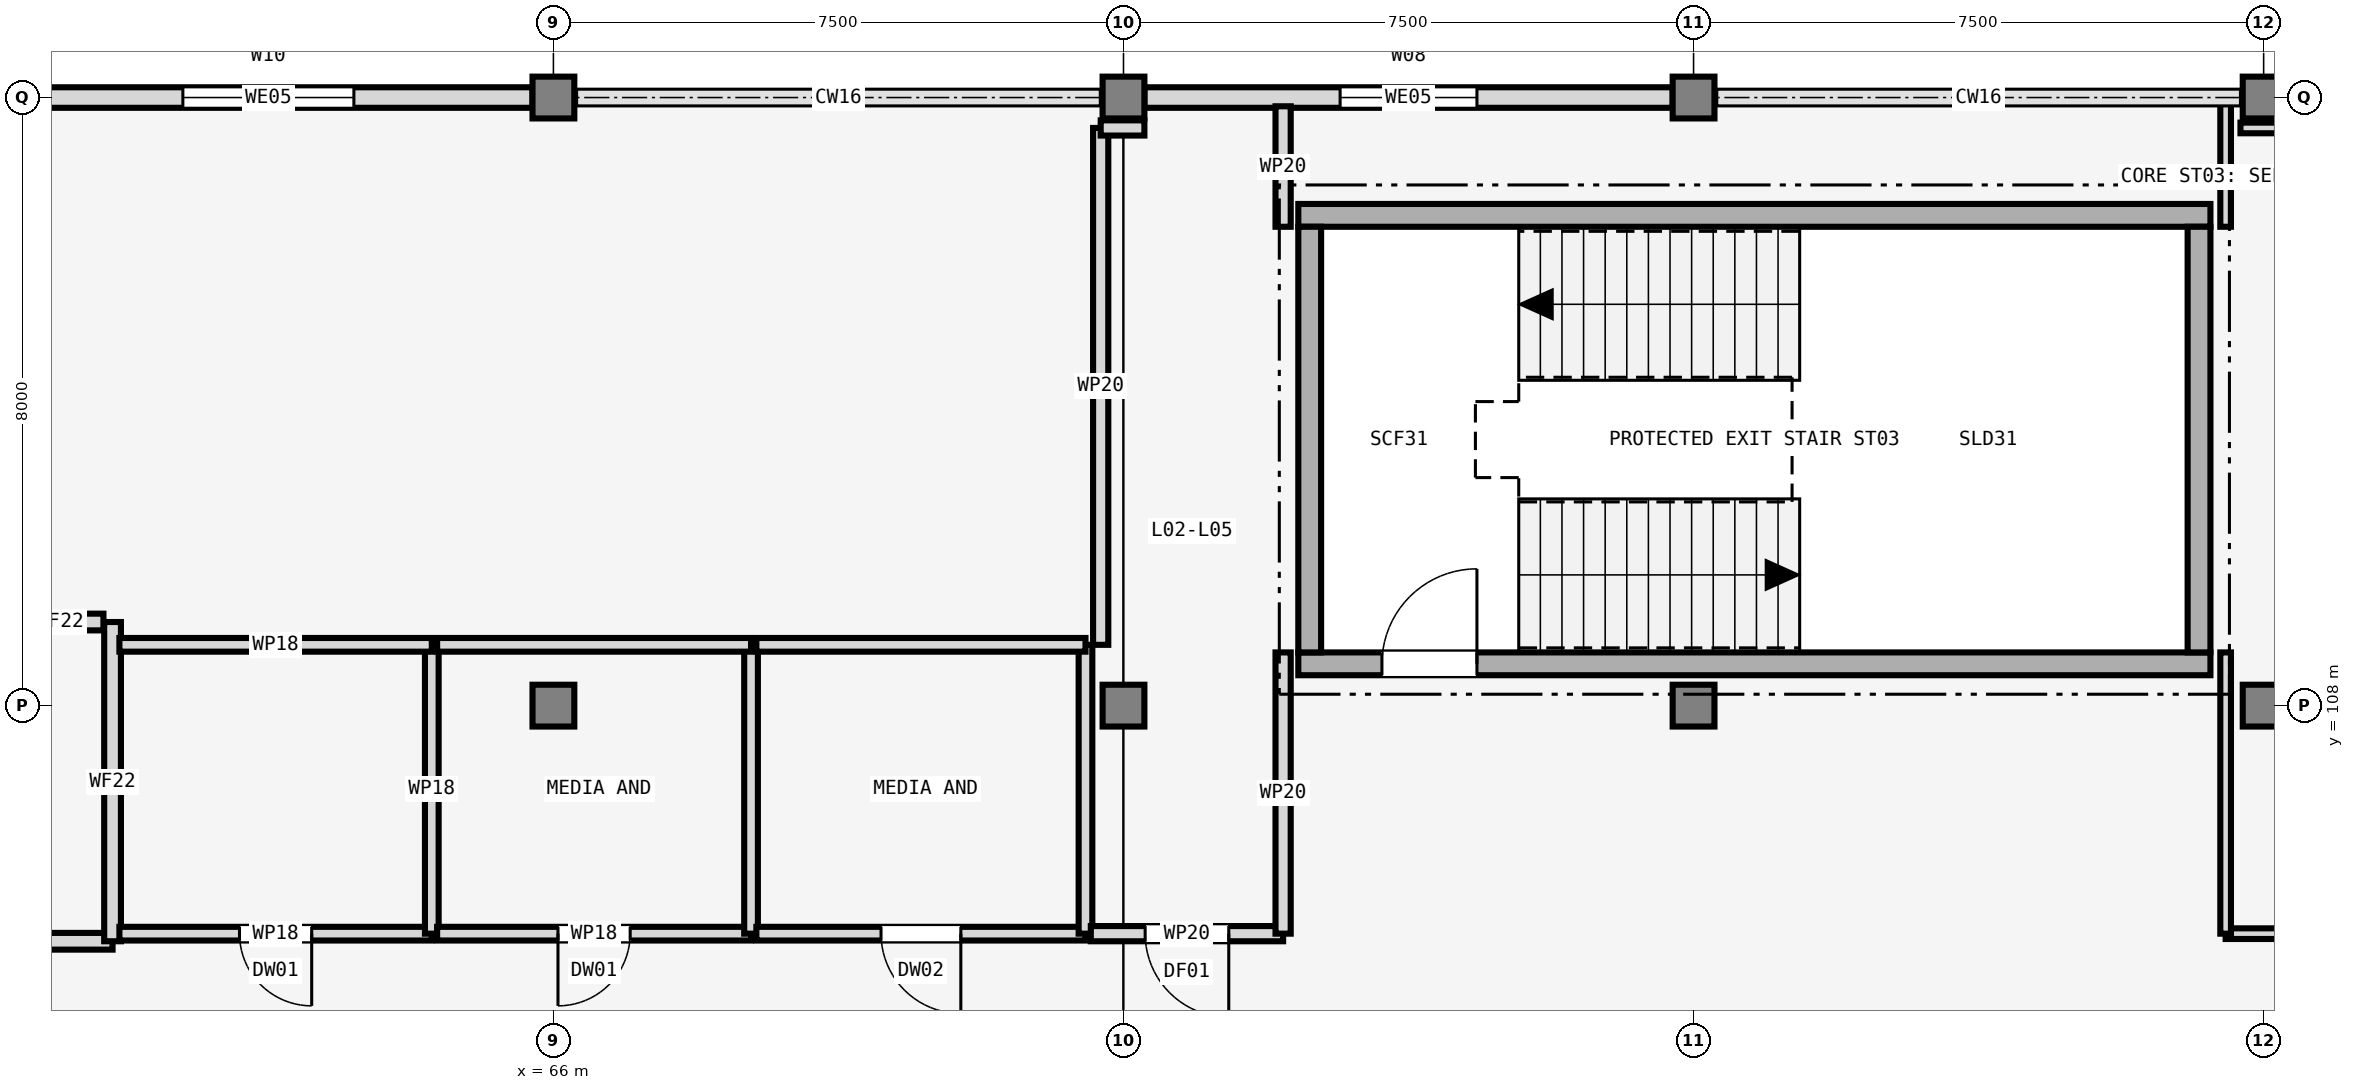
"""IFC4 building model, lengths in metres.
Left out: names, types, materials, properties, quantities, classifications, styles, units other than length and angle.
Written with IfcOpenShell. Run it as: python <this file> out.ifc"""

import sys

from ifc_helpers import new_model, si_unit, direction, frame, frame_2d, origin, origin_2d, place, context, subcontext, project, spatial, rectangle, extrude, element, fill, save


model = new_model("IFC4")
c1 = context("Model", 3, precision=1e-05, world=origin(), true_north=direction((0.0, 1.0)))
c2 = subcontext(c1, "Body", "Model", "MODEL_VIEW")
j1 = project(units=[si_unit("LENGTHUNIT", "METRE"), si_unit("PLANEANGLEUNIT", "RADIAN")], contexts=[c1])
p1 = place(None, origin())
s1 = spatial("IfcSite", under=j1, at=p1, CompositionType="ELEMENT")
p2 = place(p1, origin())
s2 = spatial("IfcBuilding", under=s1, at=p2, CompositionType="ELEMENT")
p3 = place(p2, frame((0.0, 0.0, 9.3)))
s3 = spatial("IfcBuildingStorey", under=s2, at=p3, CompositionType="ELEMENT", Elevation=9.3)
for number, where, z_axis, x_axis in (
    (1, (66.0, 108.0, 0.0), (0.0, 0.0, 1.0), (1.0, 0.0, 0.0)),
    (2, (66.0, 116.0, 0.0), (0.0, 0.0, 1.0), (1.0, 0.0, 0.0)),
    (3, (73.5, 108.0, 0.0), (0.0, 0.0, 1.0), (1.0, 0.0, 0.0)),
    (4, (73.5, 116.0, 0.0), (0.0, 0.0, 1.0), (1.0, 0.0, 0.0)),
    (5, (81.0, 108.0, 0.0), (0.0, 0.0, 1.0), (1.0, 0.0, 0.0)),
    (6, (81.0, 116.0, 0.0), (0.0, 0.0, 1.0), (1.0, 0.0, 0.0)),
    (7, (88.5, 108.0, 0.0), (0.0, 0.0, 1.0), (1.0, 0.0, 0.0)),
    (8, (88.5, 116.0, 0.0), (0.0, 0.0, 1.0), (1.0, 0.0, 0.0)),
):
    element("IfcColumn", number, at=place(p3, frame(where, z_axis=z_axis, x_axis=x_axis)), inside=s3, PredefinedType="COLUMN", context=c2, shape_type="SweptSolid", body=[
        extrude(rectangle(XDim=0.55, YDim=0.55, at=origin_2d()), origin(), (0.0, 0.0, 1.0), 4.2),
    ])
p4 = place(p3, frame((65.725, 116.0, 0.0), z_axis=(0.0, 0.0, 1.0), x_axis=(-1.0, 0.0, 0.0)))
e9 = element("IfcWall", 9, at=p4, inside=s3, PredefinedType="SOLIDWALL", context=c2, shape_type="SweptSolid", body=[
    extrude(rectangle(XDim=6.95, YDim=0.27, at=frame_2d((3.475, 0.0))), origin(), (0.0, 0.0, 1.0), 3.42),
])
p5 = place(p4, frame((2.35, 0.0, 0.95)))
e10 = element("IfcOpeningElement", 10, at=p5, cuts=e9, PredefinedType="OPENING", context=c2, shape_type="SweptSolid", body=[
    extrude(rectangle(XDim=2.25, YDim=1.65, at=frame_2d((1.125, 0.825))), frame((0.0, 0.145, 0.0), z_axis=(0.0, -1.0, 0.0), x_axis=(1.0, 0.0, 0.0)), (0.0, 0.0, 1.0), 0.29),
])
p6 = place(p3, frame((80.725, 116.0, 0.0), z_axis=(0.0, 0.0, 1.0), x_axis=(-1.0, 0.0, 0.0)))
e11 = element("IfcWall", 11, at=p6, inside=s3, PredefinedType="SOLIDWALL", context=c2, shape_type="SweptSolid", body=[
    extrude(rectangle(XDim=6.95, YDim=0.27, at=frame_2d((3.475, 0.0))), origin(), (0.0, 0.0, 1.0), 3.42),
])
p7 = place(p6, frame((2.575, 0.0, 0.95)))
e12 = element("IfcOpeningElement", 12, at=p7, cuts=e11, PredefinedType="OPENING", context=c2, shape_type="SweptSolid", body=[
    extrude(rectangle(XDim=1.8, YDim=1.5, at=frame_2d((0.9, 0.75))), frame((0.0, 0.145, 0.0), z_axis=(0.0, -1.0, 0.0), x_axis=(1.0, 0.0, 0.0)), (0.0, 0.0, 1.0), 0.29),
])
p8 = place(p3, frame((75.8, 108.55, 0.0), z_axis=(0.0, 0.0, 1.0), x_axis=(1.0, 0.0, 0.0)))
e13 = element("IfcWall", 13, at=p8, inside=s3, PredefinedType="SHEAR", context=c2, shape_type="SweptSolid", body=[
    extrude(rectangle(XDim=12.0, YDim=0.3, at=frame_2d((6.0, 0.0))), origin(), (0.0, 0.0, 1.0), 4.2),
])
p9 = place(p8, frame((1.1, 0.0, 0.0)))
e14 = element("IfcOpeningElement", 14, at=p9, cuts=e13, PredefinedType="OPENING", context=c2, shape_type="SweptSolid", body=[
    extrude(rectangle(XDim=1.25, YDim=2.15, at=frame_2d((0.625, 1.075))), frame((0.0, 0.16, 0.0), z_axis=(0.0, -1.0, 0.0), x_axis=(1.0, 0.0, 0.0)), (0.0, 0.0, 1.0), 0.32),
])
p10 = place(p3, frame((87.8, 114.45, 0.0), z_axis=(0.0, 0.0, 1.0), x_axis=(-1.0, 0.0, 0.0)))
e15 = element("IfcWall", 15, at=p10, inside=s3, PredefinedType="SHEAR", context=c2, shape_type="SweptSolid", body=[
    extrude(rectangle(XDim=12.0, YDim=0.3, at=frame_2d((6.0, 0.0))), origin(), (0.0, 0.0, 1.0), 4.2),
])
for number, where, z_axis, x_axis in (
    (16, (75.95, 114.3, 0.0), (0.0, 0.0, 1.0), (0.0, -1.0, 0.0)),
    (17, (87.65, 108.7, 0.0), (0.0, 0.0, 1.0), (0.0, 1.0, 0.0)),
):
    element("IfcWall", number, at=place(p3, frame(where, z_axis=z_axis, x_axis=x_axis)), inside=s3, PredefinedType="SHEAR", context=c2, shape_type="SweptSolid", body=[
        extrude(rectangle(XDim=5.6, YDim=0.3, at=frame_2d((2.8, 0.0))), origin(), (0.0, 0.0, 1.0), 4.2),
    ])
p11 = place(p3, frame((55.92, 104.9, 0.0), z_axis=(0.0, 0.0, 1.0), x_axis=(1.0, 0.0, 0.0)))
e18 = element("IfcWall", 18, at=p11, inside=s3, PredefinedType="SOLIDWALL", context=c2, shape_type="SweptSolid", body=[
    extrude(rectangle(XDim=4.28, YDim=0.22, at=frame_2d((2.14, 0.0))), origin(), (0.0, 0.0, 1.0), 3.12),
])
p12 = place(p11, frame((1.24, 0.0, 0.0)))
e19 = element("IfcOpeningElement", 19, at=p12, cuts=e18, PredefinedType="OPENING", context=c2, shape_type="SweptSolid", body=[
    extrude(rectangle(XDim=1.8, YDim=2.2, at=frame_2d((0.9, 1.1))), frame((0.0, 0.12, 0.0), z_axis=(0.0, -1.0, 0.0), x_axis=(1.0, 0.0, 0.0)), (0.0, 0.0, 1.0), 0.24),
])
p13 = place(p3, frame((60.2, 104.9, 0.0), z_axis=(0.0, 0.0, 1.0), x_axis=(0.0, 1.0, 0.0)))
e20 = element("IfcWall", 20, at=p13, inside=s3, PredefinedType="SOLIDWALL", context=c2, shape_type="SweptSolid", body=[
    extrude(rectangle(XDim=4.2, YDim=0.22, at=frame_2d((2.1, 0.0))), origin(), (0.0, 0.0, 1.0), 3.12),
])
p14 = place(p3, frame((58.95, 109.1, 0.0), z_axis=(0.0, 0.0, 1.0), x_axis=(1.0, 0.0, 0.0)))
e21 = element("IfcWall", 21, at=p14, inside=s3, PredefinedType="SOLIDWALL", context=c2, shape_type="SweptSolid", body=[
    extrude(rectangle(XDim=1.13, YDim=0.22, at=frame_2d((0.565, 0.0))), origin(), (0.0, 0.0, 1.0), 3.12),
])
p15 = place(p3, frame((64.4, 105.0, 0.0), z_axis=(0.0, 0.0, 1.0), x_axis=(-1.0, 0.0, 0.0)))
e22 = element("IfcWall", 22, at=p15, inside=s3, PredefinedType="PARTITIONING", context=c2, shape_type="SweptSolid", body=[
    extrude(rectangle(XDim=4.11, YDim=0.18, at=frame_2d((2.055, 0.0))), origin(), (0.0, 0.0, 1.0), 3.12),
])
p16 = place(p15, frame((1.58, 0.0, 0.0)))
e23 = element("IfcOpeningElement", 23, at=p16, cuts=e22, PredefinedType="OPENING", context=c2, shape_type="SweptSolid", body=[
    extrude(rectangle(XDim=0.95, YDim=2.1, at=frame_2d((0.475, 1.05))), frame((0.0, 0.1, 0.0), z_axis=(0.0, -1.0, 0.0), x_axis=(1.0, 0.0, 0.0)), (0.0, 0.0, 1.0), 0.2),
])
p17 = place(p3, frame((64.4, 108.8, 0.0), z_axis=(0.0, 0.0, 1.0), x_axis=(0.0, -1.0, 0.0)))
e24 = element("IfcWall", 24, at=p17, inside=s3, PredefinedType="PARTITIONING", context=c2, shape_type="SweptSolid", body=[
    extrude(rectangle(XDim=3.8, YDim=0.18, at=frame_2d((1.9, 0.0))), origin(), (0.0, 0.0, 1.0), 3.12),
])
p18 = place(p3, frame((60.29, 108.8, 0.0), z_axis=(0.0, 0.0, 1.0), x_axis=(1.0, 0.0, 0.0)))
e25 = element("IfcWall", 25, at=p18, inside=s3, PredefinedType="PARTITIONING", context=c2, shape_type="SweptSolid", body=[
    extrude(rectangle(XDim=4.11, YDim=0.18, at=frame_2d((2.055, 0.0))), origin(), (0.0, 0.0, 1.0), 3.12),
])
p19 = place(p3, frame((68.6, 105.0, 0.0), z_axis=(0.0, 0.0, 1.0), x_axis=(-1.0, 0.0, 0.0)))
e26 = element("IfcWall", 26, at=p19, inside=s3, PredefinedType="PARTITIONING", context=c2, shape_type="SweptSolid", body=[
    extrude(rectangle(XDim=4.13, YDim=0.18, at=frame_2d((2.065, 0.0))), origin(), (0.0, 0.0, 1.0), 3.12),
])
p20 = place(p19, frame((1.59, 0.0, 0.0)))
e27 = element("IfcOpeningElement", 27, at=p20, cuts=e26, PredefinedType="OPENING", context=c2, shape_type="SweptSolid", body=[
    extrude(rectangle(XDim=0.95, YDim=2.1, at=frame_2d((0.475, 1.05))), frame((0.0, 0.1, 0.0), z_axis=(0.0, -1.0, 0.0), x_axis=(1.0, 0.0, 0.0)), (0.0, 0.0, 1.0), 0.2),
])
p21 = place(p3, frame((68.6, 108.8, 0.0), z_axis=(0.0, 0.0, 1.0), x_axis=(0.0, -1.0, 0.0)))
e28 = element("IfcWall", 28, at=p21, inside=s3, PredefinedType="PARTITIONING", context=c2, shape_type="SweptSolid", body=[
    extrude(rectangle(XDim=3.8, YDim=0.18, at=frame_2d((1.9, 0.0))), origin(), (0.0, 0.0, 1.0), 3.12),
])
p22 = place(p3, frame((64.47, 108.8, 0.0), z_axis=(0.0, 0.0, 1.0), x_axis=(1.0, 0.0, 0.0)))
e29 = element("IfcWall", 29, at=p22, inside=s3, PredefinedType="PARTITIONING", context=c2, shape_type="SweptSolid", body=[
    extrude(rectangle(XDim=4.13, YDim=0.18, at=frame_2d((2.065, 0.0))), origin(), (0.0, 0.0, 1.0), 3.12),
])
p23 = place(p3, frame((73.0, 105.0, 0.0), z_axis=(0.0, 0.0, 1.0), x_axis=(-1.0, 0.0, 0.0)))
e30 = element("IfcWall", 30, at=p23, inside=s3, PredefinedType="PARTITIONING", context=c2, shape_type="SweptSolid", body=[
    extrude(rectangle(XDim=4.33, YDim=0.18, at=frame_2d((2.165, 0.0))), origin(), (0.0, 0.0, 1.0), 3.12),
])
p24 = place(p23, frame((1.64, 0.0, 0.0)))
e31 = element("IfcOpeningElement", 31, at=p24, cuts=e30, PredefinedType="OPENING", context=c2, shape_type="SweptSolid", body=[
    extrude(rectangle(XDim=1.05, YDim=2.1, at=frame_2d((0.525, 1.05))), frame((0.0, 0.1, 0.0), z_axis=(0.0, -1.0, 0.0), x_axis=(1.0, 0.0, 0.0)), (0.0, 0.0, 1.0), 0.2),
])
p25 = place(p3, frame((73.0, 108.8, 0.0), z_axis=(0.0, 0.0, 1.0), x_axis=(0.0, -1.0, 0.0)))
e32 = element("IfcWall", 32, at=p25, inside=s3, PredefinedType="PARTITIONING", context=c2, shape_type="SweptSolid", body=[
    extrude(rectangle(XDim=3.8, YDim=0.18, at=frame_2d((1.9, 0.0))), origin(), (0.0, 0.0, 1.0), 3.12),
])
p26 = place(p3, frame((68.67, 108.8, 0.0), z_axis=(0.0, 0.0, 1.0), x_axis=(1.0, 0.0, 0.0)))
e33 = element("IfcWall", 33, at=p26, inside=s3, PredefinedType="PARTITIONING", context=c2, shape_type="SweptSolid", body=[
    extrude(rectangle(XDim=4.33, YDim=0.18, at=frame_2d((2.165, 0.0))), origin(), (0.0, 0.0, 1.0), 3.12),
])
p27 = place(p3, frame((133.385, 105.0, 0.0), z_axis=(0.0, 0.0, 1.0), x_axis=(-1.0, 0.0, 0.0)))
e34 = element("IfcWall", 34, at=p27, inside=s3, PredefinedType="PARTITIONING", context=c2, shape_type="SweptSolid", body=[
    extrude(rectangle(XDim=45.385, YDim=0.14, at=frame_2d((22.692, 0.0))), origin(), (0.0, 0.0, 1.0), 3.12),
])
p28 = place(p27, frame((22.093, 0.0, 0.0)))
e35 = element("IfcOpeningElement", 35, at=p28, cuts=e34, PredefinedType="OPENING", context=c2, shape_type="SweptSolid", body=[
    extrude(rectangle(XDim=1.2, YDim=2.15, at=frame_2d((0.6, 1.075))), frame((0.0, 0.08, 0.0), z_axis=(0.0, -1.0, 0.0), x_axis=(1.0, 0.0, 0.0)), (0.0, 0.0, 1.0), 0.16),
])
p29 = place(p3, frame((88.0, 105.0, 0.0), z_axis=(0.0, 0.0, 1.0), x_axis=(0.0, 1.0, 0.0)))
e36 = element("IfcWall", 36, at=p29, inside=s3, PredefinedType="PARTITIONING", context=c2, shape_type="SweptSolid", body=[
    extrude(rectangle(XDim=3.7, YDim=0.14, at=frame_2d((1.85, 0.0))), origin(), (0.0, 0.0, 1.0), 3.12),
])
p30 = place(p3, frame((88.0, 114.3, 0.0), z_axis=(0.0, 0.0, 1.0), x_axis=(0.0, 1.0, 0.0)))
e37 = element("IfcWall", 37, at=p30, inside=s3, PredefinedType="PARTITIONING", context=c2, shape_type="SweptSolid", body=[
    extrude(rectangle(XDim=1.645, YDim=0.14, at=frame_2d((0.823, 0.0))), origin(), (0.0, 0.0, 1.0), 3.12),
])
p31 = place(p3, frame((88.195, 115.6, 0.0), z_axis=(0.0, 0.0, 1.0), x_axis=(1.0, 0.0, 0.0)))
e38 = element("IfcWall", 38, at=p31, inside=s3, PredefinedType="PARTITIONING", context=c2, shape_type="SweptSolid", body=[
    extrude(rectangle(XDim=0.58, YDim=0.14, at=frame_2d((0.29, 0.0))), origin(), (0.0, 0.0, 1.0), 3.12),
])
p32 = place(p3, frame((75.6, 105.0, 0.0), z_axis=(0.0, 0.0, 1.0), x_axis=(-1.0, 0.0, 0.0)))
e39 = element("IfcWall", 39, at=p32, inside=s3, PredefinedType="PARTITIONING", context=c2, shape_type="SweptSolid", body=[
    extrude(rectangle(XDim=2.53, YDim=0.2, at=frame_2d((1.265, 0.0))), origin(), (0.0, 0.0, 1.0), 3.12),
])
p33 = place(p32, frame((0.715, 0.0, 0.0)))
e40 = element("IfcOpeningElement", 40, at=p33, cuts=e39, PredefinedType="OPENING", context=c2, shape_type="SweptSolid", body=[
    extrude(rectangle(XDim=1.1, YDim=2.15, at=frame_2d((0.55, 1.075))), frame((0.0, 0.11, 0.0), z_axis=(0.0, -1.0, 0.0), x_axis=(1.0, 0.0, 0.0)), (0.0, 0.0, 1.0), 0.22),
])
p34 = place(p3, frame((75.6, 108.7, 0.0), z_axis=(0.0, 0.0, 1.0), x_axis=(0.0, -1.0, 0.0)))
e41 = element("IfcWall", 41, at=p34, inside=s3, PredefinedType="PARTITIONING", context=c2, shape_type="SweptSolid", body=[
    extrude(rectangle(XDim=3.7, YDim=0.2, at=frame_2d((1.85, 0.0))), origin(), (0.0, 0.0, 1.0), 3.12),
])
p35 = place(p3, frame((73.2, 108.8, 0.0), z_axis=(0.0, 0.0, 1.0), x_axis=(0.0, 1.0, 0.0)))
e42 = element("IfcWall", 42, at=p35, inside=s3, PredefinedType="PARTITIONING", context=c2, shape_type="SweptSolid", body=[
    extrude(rectangle(XDim=6.8, YDim=0.2, at=frame_2d((3.4, 0.0))), origin(), (0.0, 0.0, 1.0), 3.12),
])
p36 = place(p3, frame((75.6, 115.885, 0.0), z_axis=(0.0, 0.0, 1.0), x_axis=(0.0, -1.0, 0.0)))
e43 = element("IfcWall", 43, at=p36, inside=s3, PredefinedType="PARTITIONING", context=c2, shape_type="SweptSolid", body=[
    extrude(rectangle(XDim=1.585, YDim=0.2, at=frame_2d((0.792, 0.0))), origin(), (0.0, 0.0, 1.0), 3.12),
])
p37 = place(p3, frame((73.2, 115.6, 0.0), z_axis=(0.0, 0.0, 1.0), x_axis=(1.0, 0.0, 0.0)))
e44 = element("IfcWall", 44, at=p37, inside=s3, PredefinedType="PARTITIONING", context=c2, shape_type="SweptSolid", body=[
    extrude(rectangle(XDim=0.575, YDim=0.2, at=frame_2d((0.288, 0.0))), origin(), (0.0, 0.0, 1.0), 3.12),
])
p38 = place(p5, origin())
e45 = element("IfcWindow", 45, at=p38, inside=s3, PartitioningType="SINGLE_PANEL", PredefinedType="WINDOW", context=c2, shape_type="SweptSolid", body=[
    extrude(rectangle(XDim=2.25, YDim=1.65, at=frame_2d((1.125, 0.825))), frame((0.0, 0.03, 0.0), z_axis=(0.0, -1.0, 0.0), x_axis=(1.0, 0.0, 0.0)), (0.0, 0.0, 1.0), 0.06),
])
fill(e10, e45)
p39 = place(p7, origin())
e46 = element("IfcWindow", 46, at=p39, inside=s3, PartitioningType="SINGLE_PANEL", PredefinedType="WINDOW", context=c2, shape_type="SweptSolid", body=[
    extrude(rectangle(XDim=1.8, YDim=1.5, at=frame_2d((0.9, 0.75))), frame((0.0, 0.03, 0.0), z_axis=(0.0, -1.0, 0.0), x_axis=(1.0, 0.0, 0.0)), (0.0, 0.0, 1.0), 0.06),
])
fill(e12, e46)
p40 = place(p9, origin())
e47 = element("IfcDoor", 47, at=p40, inside=s3, OperationType="SINGLE_SWING_RIGHT", PredefinedType="DOOR", context=c2, shape_type="SweptSolid", body=[
    extrude(rectangle(XDim=1.25, YDim=2.15, at=frame_2d((0.625, 1.075))), frame((0.0, 0.025, 0.0), z_axis=(0.0, -1.0, 0.0), x_axis=(1.0, 0.0, 0.0)), (0.0, 0.0, 1.0), 0.05),
])
fill(e14, e47)
p41 = place(p16, origin())
e48 = element("IfcDoor", 48, at=p41, inside=s3, OperationType="SINGLE_SWING_LEFT", PredefinedType="DOOR", context=c2, shape_type="SweptSolid", body=[
    extrude(rectangle(XDim=0.95, YDim=2.1, at=frame_2d((0.475, 1.05))), frame((0.0, 0.025, 0.0), z_axis=(0.0, -1.0, 0.0), x_axis=(1.0, 0.0, 0.0)), (0.0, 0.0, 1.0), 0.05),
])
fill(e23, e48)
p42 = place(p20, origin())
e49 = element("IfcDoor", 49, at=p42, inside=s3, OperationType="SINGLE_SWING_RIGHT", PredefinedType="DOOR", context=c2, shape_type="SweptSolid", body=[
    extrude(rectangle(XDim=0.95, YDim=2.1, at=frame_2d((0.475, 1.05))), frame((0.0, 0.025, 0.0), z_axis=(0.0, -1.0, 0.0), x_axis=(1.0, 0.0, 0.0)), (0.0, 0.0, 1.0), 0.05),
])
fill(e27, e49)
p43 = place(p24, origin())
e50 = element("IfcDoor", 50, at=p43, inside=s3, OperationType="SINGLE_SWING_LEFT", PredefinedType="DOOR", context=c2, shape_type="SweptSolid", body=[
    extrude(rectangle(XDim=1.05, YDim=2.1, at=frame_2d((0.525, 1.05))), frame((0.0, 0.025, 0.0), z_axis=(0.0, -1.0, 0.0), x_axis=(1.0, 0.0, 0.0)), (0.0, 0.0, 1.0), 0.05),
])
fill(e31, e50)
p44 = place(p33, origin())
e51 = element("IfcDoor", 51, at=p44, inside=s3, OperationType="SINGLE_SWING_LEFT", PredefinedType="DOOR", context=c2, shape_type="SweptSolid", body=[
    extrude(rectangle(XDim=1.1, YDim=2.15, at=frame_2d((0.55, 1.075))), frame((0.0, 0.025, 0.0), z_axis=(0.0, -1.0, 0.0), x_axis=(1.0, 0.0, 0.0)), (0.0, 0.0, 1.0), 0.05),
])
fill(e40, e51)
save(model, sys.argv[1])
